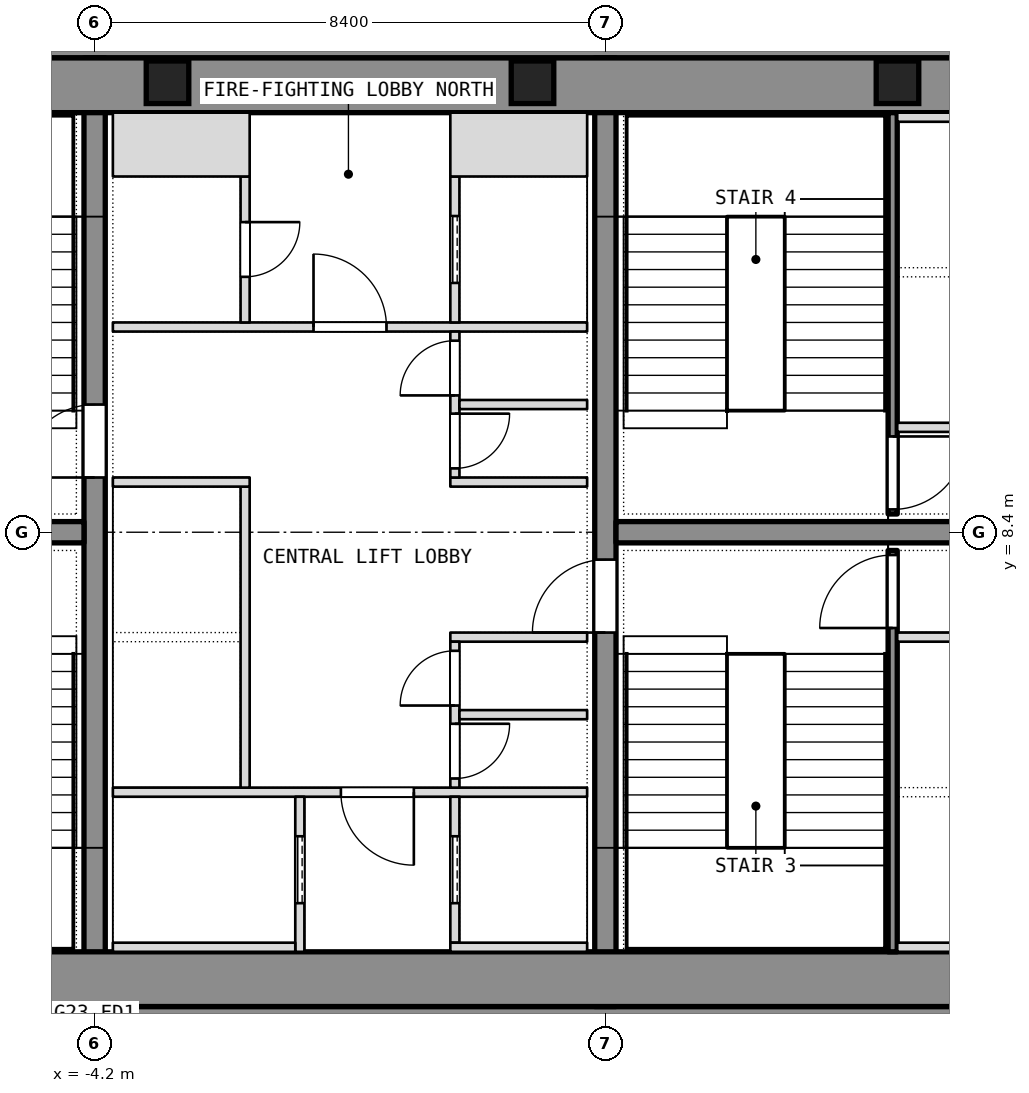
"""IFC4 building model, lengths in metres.
Left out: names, types, materials, properties, quantities, classifications, styles, units other than length and angle.
Written with IfcOpenShell. Run it as: python <this file> out.ifc"""

import sys

from ifc_helpers import new_model, si_unit, direction, frame, frame_2d, origin, origin_2d, place, context, subcontext, project, spatial, rectangle, extrude, element, fill, save


model = new_model("IFC4")
c1 = context("Model", 3, precision=1e-05, world=origin(), true_north=direction((0.0, 1.0)))
c2 = subcontext(c1, "Body", "Model", "MODEL_VIEW")
j1 = project(units=[si_unit("LENGTHUNIT", "METRE"), si_unit("PLANEANGLEUNIT", "RADIAN")], contexts=[c1])
p1 = place(None, origin())
s1 = spatial("IfcSite", under=j1, at=p1, CompositionType="ELEMENT")
p2 = place(p1, origin())
s2 = spatial("IfcBuilding", under=s1, at=p2, CompositionType="ELEMENT")
p3 = place(p2, frame((0.0, 0.0, 270.5)))
s3 = spatial("IfcBuildingStorey", under=s2, at=p3, CompositionType="ELEMENT", Elevation=270.5)
for number, where, z_axis, x_axis in (
    (1, (-11.1, 0.3, 0.0), (0.0, 0.0, 1.0), (1.0, 0.0, 0.0)),
    (2, (-11.1, 16.5, 0.0), (0.0, 0.0, 1.0), (1.0, 0.0, 0.0)),
):
    element("IfcWall", number, at=place(p3, frame(where, z_axis=z_axis, x_axis=x_axis)), inside=s3, PredefinedType="SHEAR", context=c2, shape_type="SweptSolid", body=[
        extrude(rectangle(XDim=22.2, YDim=0.6, at=frame_2d((11.1, 0.0))), origin(), (0.0, 0.0, 1.0), 3.6),
    ])
p4 = place(p3, frame((-4.2, 0.6, 0.0), z_axis=(0.0, 0.0, 1.0), x_axis=(0.0, 1.0, 0.0)))
e3 = element("IfcWall", 3, at=p4, inside=s3, PredefinedType="SHEAR", context=c2, shape_type="SweptSolid", body=[
    extrude(rectangle(XDim=15.6, YDim=0.35, at=frame_2d((7.8, 0.0))), origin(), (0.0, 0.0, 1.0), 3.6),
])
p5 = place(p4, frame((8.7, 0.0, 0.0)))
e4 = element("IfcOpeningElement", 4, at=p5, cuts=e3, PredefinedType="OPENING", context=c2, shape_type="SweptSolid", body=[
    extrude(rectangle(XDim=1.2, YDim=2.1, at=frame_2d((0.6, 1.05))), frame((0.0, 0.175, 0.0), z_axis=(0.0, -1.0, 0.0), x_axis=(1.0, 0.0, 0.0)), (0.0, 0.0, 1.0), 0.35),
])
p6 = place(p3, frame((4.2, 0.6, 0.0), z_axis=(0.0, 0.0, 1.0), x_axis=(0.0, 1.0, 0.0)))
e5 = element("IfcWall", 5, at=p6, inside=s3, PredefinedType="SHEAR", context=c2, shape_type="SweptSolid", body=[
    extrude(rectangle(XDim=15.6, YDim=0.35, at=frame_2d((7.8, 0.0))), origin(), (0.0, 0.0, 1.0), 3.6),
])
p7 = place(p6, frame((6.15, 0.0, 0.0)))
e6 = element("IfcOpeningElement", 6, at=p7, cuts=e5, PredefinedType="OPENING", context=c2, shape_type="SweptSolid", body=[
    extrude(rectangle(XDim=1.2, YDim=2.1, at=frame_2d((0.6, 1.05))), frame((0.0, 0.175, 0.0), z_axis=(0.0, -1.0, 0.0), x_axis=(1.0, 0.0, 0.0)), (0.0, 0.0, 1.0), 0.35),
])
for number, where, z_axis, x_axis in (
    (7, (-11.1, 8.4, 0.0), (0.0, 0.0, 1.0), (1.0, 0.0, 0.0)),
    (8, (4.375, 8.4, 0.0), (0.0, 0.0, 1.0), (1.0, 0.0, 0.0)),
):
    element("IfcWall", number, at=place(p3, frame(where, z_axis=z_axis, x_axis=x_axis)), inside=s3, PredefinedType="SHEAR", context=c2, shape_type="SweptSolid", body=[
        extrude(rectangle(XDim=6.725, YDim=0.35, at=frame_2d((3.363, 0.0))), origin(), (0.0, 0.0, 1.0), 3.6),
    ])
for number, where, z_axis, x_axis in (
    (9, (-3.001, 15.8, 0.0), (0.0, 0.0, 1.0), (1.0, 0.0, 0.0)),
    (10, (3.001, 15.8, 0.0), (0.0, 0.0, 1.0), (1.0, 0.0, 0.0)),
    (11, (9.004, 15.8, 0.0), (0.0, 0.0, 1.0), (1.0, 0.0, 0.0)),
):
    element("IfcColumn", number, at=place(p3, frame(where, z_axis=z_axis, x_axis=x_axis)), inside=s3, PredefinedType="COLUMN", context=c2, shape_type="SweptSolid", body=[
        extrude(rectangle(XDim=0.7, YDim=0.7, at=origin_2d()), origin(), (0.0, 0.0, 1.0), 3.6),
    ])
for number, where, z_axis, x_axis in (
    (12, (-11.1, 1.05, 0.0), (0.0, 0.0, 1.0), (1.0, 0.0, 0.0)),
    (13, (-11.1, 15.75, 0.0), (0.0, 0.0, 1.0), (1.0, 0.0, 0.0)),
):
    element("IfcWall", number, at=place(p3, frame(where, z_axis=z_axis, x_axis=x_axis)), inside=s3, PredefinedType="PARTITIONING", context=c2, shape_type="SweptSolid", body=[
        extrude(rectangle(XDim=22.2, YDim=0.9, at=frame_2d((11.1, 0.0))), origin(), (0.0, 0.0, 1.0), 3.34),
    ])
p8 = place(p3, frame((8.925, 1.5, 0.0), z_axis=(0.0, 0.0, 1.0), x_axis=(0.0, 1.0, 0.0)))
e14 = element("IfcWall", 14, at=p8, inside=s3, PredefinedType="SHEAR", context=c2, shape_type="SweptSolid", body=[
    extrude(rectangle(XDim=6.6, YDim=0.15, at=frame_2d((3.3, 0.0))), origin(), (0.0, 0.0, 1.0), 3.34),
])
p9 = place(p8, frame((5.325, 0.0, 0.0)))
e15 = element("IfcOpeningElement", 15, at=p9, cuts=e14, PredefinedType="OPENING", context=c2, shape_type="SweptSolid", body=[
    extrude(rectangle(XDim=1.2, YDim=2.1, at=frame_2d((0.6, 1.05))), frame((0.0, 0.075, 0.0), z_axis=(0.0, -1.0, 0.0), x_axis=(1.0, 0.0, 0.0)), (0.0, 0.0, 1.0), 0.15),
])
for number, where, z_axis, x_axis in (
    (16, (9.0, 6.675, 0.0), (0.0, 0.0, 1.0), (1.0, 0.0, 0.0)),
    (17, (9.0, 1.575, 0.0), (0.0, 0.0, 1.0), (1.0, 0.0, 0.0)),
):
    element("IfcWall", number, at=place(p3, frame(where, z_axis=z_axis, x_axis=x_axis)), inside=s3, PredefinedType="SHEAR", context=c2, shape_type="SweptSolid", body=[
        extrude(rectangle(XDim=2.1, YDim=0.15, at=frame_2d((1.05, 0.0))), origin(), (0.0, 0.0, 1.0), 3.6),
    ])
p10 = place(p3, frame((8.925, 8.7, 0.0), z_axis=(0.0, 0.0, 1.0), x_axis=(0.0, 1.0, 0.0)))
e18 = element("IfcWall", 18, at=p10, inside=s3, PredefinedType="SHEAR", context=c2, shape_type="SweptSolid", body=[
    extrude(rectangle(XDim=6.6, YDim=0.15, at=frame_2d((3.3, 0.0))), origin(), (0.0, 0.0, 1.0), 3.34),
])
p11 = place(p10, frame((0.075, 0.0, 0.0)))
e19 = element("IfcOpeningElement", 19, at=p11, cuts=e18, PredefinedType="OPENING", context=c2, shape_type="SweptSolid", body=[
    extrude(rectangle(XDim=1.2, YDim=2.1, at=frame_2d((0.6, 1.05))), frame((0.0, 0.075, 0.0), z_axis=(0.0, -1.0, 0.0), x_axis=(1.0, 0.0, 0.0)), (0.0, 0.0, 1.0), 0.15),
])
for number, where, z_axis, x_axis in (
    (20, (9.0, 10.125, 0.0), (0.0, 0.0, 1.0), (1.0, 0.0, 0.0)),
    (21, (9.0, 15.225, 0.0), (0.0, 0.0, 1.0), (1.0, 0.0, 0.0)),
):
    element("IfcWall", number, at=place(p3, frame(where, z_axis=z_axis, x_axis=x_axis)), inside=s3, PredefinedType="SHEAR", context=c2, shape_type="SweptSolid", body=[
        extrude(rectangle(XDim=2.1, YDim=0.15, at=frame_2d((1.05, 0.0))), origin(), (0.0, 0.0, 1.0), 3.6),
    ])
p12 = place(p3, frame((-3.9, 4.125, 0.0), z_axis=(0.0, 0.0, 1.0), x_axis=(1.0, 0.0, 0.0)))
e22 = element("IfcWall", 22, at=p12, inside=s3, PredefinedType="PARTITIONING", context=c2, shape_type="SweptSolid", body=[
    extrude(rectangle(XDim=7.8, YDim=0.15, at=frame_2d((3.9, 0.0))), origin(), (0.0, 0.0, 1.0), 3.34),
])
p13 = place(p12, frame((3.75, 0.0, 0.0)))
e23 = element("IfcOpeningElement", 23, at=p13, cuts=e22, PredefinedType="OPENING", context=c2, shape_type="SweptSolid", body=[
    extrude(rectangle(XDim=1.2, YDim=2.1, at=frame_2d((0.6, 1.05))), frame((0.0, 0.075, 0.0), z_axis=(0.0, -1.0, 0.0), x_axis=(1.0, 0.0, 0.0)), (0.0, 0.0, 1.0), 0.15),
])
p14 = place(p3, frame((-3.9, 11.775, 0.0), z_axis=(0.0, 0.0, 1.0), x_axis=(1.0, 0.0, 0.0)))
e24 = element("IfcWall", 24, at=p14, inside=s3, PredefinedType="PARTITIONING", context=c2, shape_type="SweptSolid", body=[
    extrude(rectangle(XDim=7.8, YDim=0.15, at=frame_2d((3.9, 0.0))), origin(), (0.0, 0.0, 1.0), 3.34),
])
p15 = place(p14, frame((3.3, 0.0, 0.0)))
e25 = element("IfcOpeningElement", 25, at=p15, cuts=e24, PredefinedType="OPENING", context=c2, shape_type="SweptSolid", body=[
    extrude(rectangle(XDim=1.2, YDim=2.1, at=frame_2d((0.6, 1.05))), frame((0.0, 0.075, 0.0), z_axis=(0.0, -1.0, 0.0), x_axis=(1.0, 0.0, 0.0)), (0.0, 0.0, 1.0), 0.15),
])
p16 = place(p3, frame((-0.825, 1.5, 0.0), z_axis=(0.0, 0.0, 1.0), x_axis=(0.0, 1.0, 0.0)))
e26 = element("IfcWall", 26, at=p16, inside=s3, PredefinedType="SHEAR", context=c2, shape_type="SweptSolid", body=[
    extrude(rectangle(XDim=2.55, YDim=0.15, at=frame_2d((1.275, 0.0))), origin(), (0.0, 0.0, 1.0), 3.6),
])
p17 = place(p16, frame((0.8, 0.0, 0.0)))
e27 = element("IfcOpeningElement", 27, at=p17, cuts=e26, PredefinedType="OPENING", context=c2, shape_type="SweptSolid", body=[
    extrude(rectangle(XDim=1.1, YDim=2.1, at=frame_2d((0.55, 1.05))), frame((0.0, 0.075, 0.0), z_axis=(0.0, -1.0, 0.0), x_axis=(1.0, 0.0, 0.0)), (0.0, 0.0, 1.0), 0.15),
])
p18 = place(p3, frame((-3.9, 1.575, 0.0), z_axis=(0.0, 0.0, 1.0), x_axis=(1.0, 0.0, 0.0)))
e28 = element("IfcWall", 28, at=p18, inside=s3, PredefinedType="SHEAR", context=c2, shape_type="SweptSolid", body=[
    extrude(rectangle(XDim=3.0, YDim=0.15, at=frame_2d((1.5, 0.0))), origin(), (0.0, 0.0, 1.0), 3.6),
])
p19 = place(p3, frame((-1.725, 4.2, 0.0), z_axis=(0.0, 0.0, 1.0), x_axis=(0.0, 1.0, 0.0)))
e29 = element("IfcWall", 29, at=p19, inside=s3, PredefinedType="SHEAR", context=c2, shape_type="SweptSolid", body=[
    extrude(rectangle(XDim=4.95, YDim=0.15, at=frame_2d((2.475, 0.0))), origin(), (0.0, 0.0, 1.0), 3.6),
])
p20 = place(p3, frame((-3.9, 9.225, 0.0), z_axis=(0.0, 0.0, 1.0), x_axis=(1.0, 0.0, 0.0)))
e30 = element("IfcWall", 30, at=p20, inside=s3, PredefinedType="SHEAR", context=c2, shape_type="SweptSolid", body=[
    extrude(rectangle(XDim=2.25, YDim=0.15, at=frame_2d((1.125, 0.0))), origin(), (0.0, 0.0, 1.0), 3.6),
])
p21 = place(p3, frame((-1.725, 11.85, 0.0), z_axis=(0.0, 0.0, 1.0), x_axis=(0.0, 1.0, 0.0)))
e31 = element("IfcWall", 31, at=p21, inside=s3, PredefinedType="PARTITIONING", context=c2, shape_type="SweptSolid", body=[
    extrude(rectangle(XDim=2.4, YDim=0.15, at=frame_2d((1.2, 0.0))), origin(), (0.0, 0.0, 1.0), 3.34),
])
p22 = place(p21, frame((0.75, 0.0, 0.0)))
e32 = element("IfcOpeningElement", 32, at=p22, cuts=e31, PredefinedType="OPENING", context=c2, shape_type="SweptSolid", body=[
    extrude(rectangle(XDim=0.9, YDim=2.1, at=frame_2d((0.45, 1.05))), frame((0.0, 0.075, 0.0), z_axis=(0.0, -1.0, 0.0), x_axis=(1.0, 0.0, 0.0)), (0.0, 0.0, 1.0), 0.15),
])
p23 = place(p3, frame((-3.9, 14.775, 0.0), z_axis=(0.0, 0.0, 1.0), x_axis=(1.0, 0.0, 0.0)))
e33 = element("IfcWall", 33, at=p23, inside=s3, PredefinedType="PARTITIONING", context=c2, shape_type="SweptSolid", body=[
    extrude(rectangle(XDim=2.25, YDim=1.05, at=frame_2d((1.125, 0.0))), origin(), (0.0, 0.0, 1.0), 3.34),
])
p24 = place(p3, frame((1.725, 1.65, 0.0), z_axis=(0.0, 0.0, 1.0), x_axis=(0.0, 1.0, 0.0)))
e34 = element("IfcWall", 34, at=p24, inside=s3, PredefinedType="SHEAR", context=c2, shape_type="SweptSolid", body=[
    extrude(rectangle(XDim=2.4, YDim=0.15, at=frame_2d((1.2, 0.0))), origin(), (0.0, 0.0, 1.0), 3.6),
])
p25 = place(p24, frame((0.65, 0.0, 0.0)))
e35 = element("IfcOpeningElement", 35, at=p25, cuts=e34, PredefinedType="OPENING", context=c2, shape_type="SweptSolid", body=[
    extrude(rectangle(XDim=1.1, YDim=2.1, at=frame_2d((0.55, 1.05))), frame((0.0, 0.075, 0.0), z_axis=(0.0, -1.0, 0.0), x_axis=(1.0, 0.0, 0.0)), (0.0, 0.0, 1.0), 0.15),
])
p26 = place(p3, frame((1.65, 1.575, 0.0), z_axis=(0.0, 0.0, 1.0), x_axis=(1.0, 0.0, 0.0)))
e36 = element("IfcWall", 36, at=p26, inside=s3, PredefinedType="SHEAR", context=c2, shape_type="SweptSolid", body=[
    extrude(rectangle(XDim=2.25, YDim=0.15, at=frame_2d((1.125, 0.0))), origin(), (0.0, 0.0, 1.0), 3.6),
])
p27 = place(p3, frame((1.725, 11.85, 0.0), z_axis=(0.0, 0.0, 1.0), x_axis=(0.0, 1.0, 0.0)))
e37 = element("IfcWall", 37, at=p27, inside=s3, PredefinedType="SHEAR", context=c2, shape_type="SweptSolid", body=[
    extrude(rectangle(XDim=2.4, YDim=0.15, at=frame_2d((1.2, 0.0))), origin(), (0.0, 0.0, 1.0), 3.6),
])
p28 = place(p27, frame((0.65, 0.0, 0.0)))
e38 = element("IfcOpeningElement", 38, at=p28, cuts=e37, PredefinedType="OPENING", context=c2, shape_type="SweptSolid", body=[
    extrude(rectangle(XDim=1.1, YDim=2.1, at=frame_2d((0.55, 1.05))), frame((0.0, 0.075, 0.0), z_axis=(0.0, -1.0, 0.0), x_axis=(1.0, 0.0, 0.0)), (0.0, 0.0, 1.0), 0.15),
])
p29 = place(p3, frame((1.65, 14.775, 0.0), z_axis=(0.0, 0.0, 1.0), x_axis=(1.0, 0.0, 0.0)))
e39 = element("IfcWall", 39, at=p29, inside=s3, PredefinedType="SHEAR", context=c2, shape_type="SweptSolid", body=[
    extrude(rectangle(XDim=2.25, YDim=1.05, at=frame_2d((1.125, 0.0))), origin(), (0.0, 0.0, 1.0), 3.6),
])
for number, where, z_axis, x_axis in (
    (40, (1.65, 6.675, 0.0), (0.0, 0.0, 1.0), (1.0, 0.0, 0.0)),
    (41, (1.65, 9.225, 0.0), (0.0, 0.0, 1.0), (1.0, 0.0, 0.0)),
):
    element("IfcWall", number, at=place(p3, frame(where, z_axis=z_axis, x_axis=x_axis)), inside=s3, PredefinedType="PARTITIONING", context=c2, shape_type="SweptSolid", body=[
        extrude(rectangle(XDim=2.25, YDim=0.15, at=frame_2d((1.125, 0.0))), origin(), (0.0, 0.0, 1.0), 3.34),
    ])
p30 = place(p3, frame((1.725, 4.2, 0.0), z_axis=(0.0, 0.0, 1.0), x_axis=(0.0, 1.0, 0.0)))
e42 = element("IfcWall", 42, at=p30, inside=s3, PredefinedType="PARTITIONING", context=c2, shape_type="SweptSolid", body=[
    extrude(rectangle(XDim=2.4, YDim=0.15, at=frame_2d((1.2, 0.0))), origin(), (0.0, 0.0, 1.0), 3.34),
])
p31 = place(p30, frame((0.15, 0.0, 0.0)))
e43 = element("IfcOpeningElement", 43, at=p31, cuts=e42, PredefinedType="OPENING", context=c2, shape_type="SweptSolid", body=[
    extrude(rectangle(XDim=0.9, YDim=2.1, at=frame_2d((0.45, 1.05))), frame((0.0, 0.075, 0.0), z_axis=(0.0, -1.0, 0.0), x_axis=(1.0, 0.0, 0.0)), (0.0, 0.0, 1.0), 0.15),
])
p32 = place(p30, frame((1.35, 0.0, 0.0)))
e44 = element("IfcOpeningElement", 44, at=p32, cuts=e42, PredefinedType="OPENING", context=c2, shape_type="SweptSolid", body=[
    extrude(rectangle(XDim=0.9, YDim=2.1, at=frame_2d((0.45, 1.05))), frame((0.0, 0.075, 0.0), z_axis=(0.0, -1.0, 0.0), x_axis=(1.0, 0.0, 0.0)), (0.0, 0.0, 1.0), 0.15),
])
p33 = place(p3, frame((1.725, 9.3, 0.0), z_axis=(0.0, 0.0, 1.0), x_axis=(0.0, 1.0, 0.0)))
e45 = element("IfcWall", 45, at=p33, inside=s3, PredefinedType="PARTITIONING", context=c2, shape_type="SweptSolid", body=[
    extrude(rectangle(XDim=2.4, YDim=0.15, at=frame_2d((1.2, 0.0))), origin(), (0.0, 0.0, 1.0), 3.34),
])
p34 = place(p33, frame((0.15, 0.0, 0.0)))
e46 = element("IfcOpeningElement", 46, at=p34, cuts=e45, PredefinedType="OPENING", context=c2, shape_type="SweptSolid", body=[
    extrude(rectangle(XDim=0.9, YDim=2.1, at=frame_2d((0.45, 1.05))), frame((0.0, 0.075, 0.0), z_axis=(0.0, -1.0, 0.0), x_axis=(1.0, 0.0, 0.0)), (0.0, 0.0, 1.0), 0.15),
])
p35 = place(p33, frame((1.35, 0.0, 0.0)))
e47 = element("IfcOpeningElement", 47, at=p35, cuts=e45, PredefinedType="OPENING", context=c2, shape_type="SweptSolid", body=[
    extrude(rectangle(XDim=0.9, YDim=2.1, at=frame_2d((0.45, 1.05))), frame((0.0, 0.075, 0.0), z_axis=(0.0, -1.0, 0.0), x_axis=(1.0, 0.0, 0.0)), (0.0, 0.0, 1.0), 0.15),
])
for number, where, z_axis, x_axis in (
    (48, (1.8, 5.4, 0.0), (0.0, 0.0, 1.0), (1.0, 0.0, 0.0)),
    (49, (1.8, 10.5, 0.0), (0.0, 0.0, 1.0), (1.0, 0.0, 0.0)),
):
    element("IfcWall", number, at=place(p3, frame(where, z_axis=z_axis, x_axis=x_axis)), inside=s3, PredefinedType="PARTITIONING", context=c2, shape_type="SweptSolid", body=[
        extrude(rectangle(XDim=2.1, YDim=0.15, at=frame_2d((1.05, 0.0))), origin(), (0.0, 0.0, 1.0), 3.34),
    ])
p36 = place(p9, origin())
e50 = element("IfcDoor", 50, at=p36, inside=s3, OperationType="SINGLE_SWING_LEFT", PredefinedType="DOOR", context=c2, shape_type="SweptSolid", body=[
    extrude(rectangle(XDim=1.2, YDim=2.1, at=frame_2d((0.6, 1.05))), frame((0.0, 0.025, 0.0), z_axis=(0.0, -1.0, 0.0), x_axis=(1.0, 0.0, 0.0)), (0.0, 0.0, 1.0), 0.05),
])
fill(e15, e50)
p37 = place(p11, origin())
e51 = element("IfcDoor", 51, at=p37, inside=s3, OperationType="SINGLE_SWING_LEFT", PredefinedType="DOOR", context=c2, shape_type="SweptSolid", body=[
    extrude(rectangle(XDim=1.2, YDim=2.1, at=frame_2d((0.6, 1.05))), frame((0.0, 0.025, 0.0), z_axis=(0.0, -1.0, 0.0), x_axis=(1.0, 0.0, 0.0)), (0.0, 0.0, 1.0), 0.05),
])
fill(e19, e51)
p38 = place(p31, origin())
e52 = element("IfcDoor", 52, at=p38, inside=s3, OperationType="SINGLE_SWING_LEFT", PredefinedType="DOOR", context=c2, shape_type="SweptSolid", body=[
    extrude(rectangle(XDim=0.9, YDim=2.1, at=frame_2d((0.45, 1.05))), frame((0.0, 0.025, 0.0), z_axis=(0.0, -1.0, 0.0), x_axis=(1.0, 0.0, 0.0)), (0.0, 0.0, 1.0), 0.05),
])
fill(e43, e52)
p39 = place(p32, origin())
e53 = element("IfcDoor", 53, at=p39, inside=s3, OperationType="SINGLE_SWING_LEFT", PredefinedType="DOOR", context=c2, shape_type="SweptSolid", body=[
    extrude(rectangle(XDim=0.9, YDim=2.1, at=frame_2d((0.45, 1.05))), frame((0.0, 0.025, 0.0), z_axis=(0.0, -1.0, 0.0), x_axis=(1.0, 0.0, 0.0)), (0.0, 0.0, 1.0), 0.05),
])
fill(e44, e53)
p40 = place(p34, origin())
e54 = element("IfcDoor", 54, at=p40, inside=s3, OperationType="SINGLE_SWING_LEFT", PredefinedType="DOOR", context=c2, shape_type="SweptSolid", body=[
    extrude(rectangle(XDim=0.9, YDim=2.1, at=frame_2d((0.45, 1.05))), frame((0.0, 0.025, 0.0), z_axis=(0.0, -1.0, 0.0), x_axis=(1.0, 0.0, 0.0)), (0.0, 0.0, 1.0), 0.05),
])
fill(e46, e54)
p41 = place(p35, origin())
e55 = element("IfcDoor", 55, at=p41, inside=s3, OperationType="SINGLE_SWING_LEFT", PredefinedType="DOOR", context=c2, shape_type="SweptSolid", body=[
    extrude(rectangle(XDim=0.9, YDim=2.1, at=frame_2d((0.45, 1.05))), frame((0.0, 0.025, 0.0), z_axis=(0.0, -1.0, 0.0), x_axis=(1.0, 0.0, 0.0)), (0.0, 0.0, 1.0), 0.05),
])
fill(e47, e55)
p42 = place(p17, origin())
e56 = element("IfcDoor", 56, at=p42, inside=s3, OperationType="SLIDING_TO_LEFT", PredefinedType="DOOR", context=c2, shape_type="SweptSolid", body=[
    extrude(rectangle(XDim=1.1, YDim=2.1, at=frame_2d((0.55, 1.05))), frame((0.0, 0.025, 0.0), z_axis=(0.0, -1.0, 0.0), x_axis=(1.0, 0.0, 0.0)), (0.0, 0.0, 1.0), 0.05),
])
fill(e27, e56)
p43 = place(p25, origin())
e57 = element("IfcDoor", 57, at=p43, inside=s3, OperationType="SLIDING_TO_LEFT", PredefinedType="DOOR", context=c2, shape_type="SweptSolid", body=[
    extrude(rectangle(XDim=1.1, YDim=2.1, at=frame_2d((0.55, 1.05))), frame((0.0, 0.025, 0.0), z_axis=(0.0, -1.0, 0.0), x_axis=(1.0, 0.0, 0.0)), (0.0, 0.0, 1.0), 0.05),
])
fill(e35, e57)
p44 = place(p28, origin())
e58 = element("IfcDoor", 58, at=p44, inside=s3, OperationType="SLIDING_TO_LEFT", PredefinedType="DOOR", context=c2, shape_type="SweptSolid", body=[
    extrude(rectangle(XDim=1.1, YDim=2.1, at=frame_2d((0.55, 1.05))), frame((0.0, 0.025, 0.0), z_axis=(0.0, -1.0, 0.0), x_axis=(1.0, 0.0, 0.0)), (0.0, 0.0, 1.0), 0.05),
])
fill(e38, e58)
p45 = place(p13, origin())
e59 = element("IfcDoor", 59, at=p45, inside=s3, OperationType="SINGLE_SWING_LEFT", PredefinedType="DOOR", context=c2, shape_type="SweptSolid", body=[
    extrude(rectangle(XDim=1.2, YDim=2.1, at=frame_2d((0.6, 1.05))), frame((0.0, 0.025, 0.0), z_axis=(0.0, -1.0, 0.0), x_axis=(1.0, 0.0, 0.0)), (0.0, 0.0, 1.0), 0.05),
])
fill(e23, e59)
p46 = place(p15, origin())
e60 = element("IfcDoor", 60, at=p46, inside=s3, OperationType="SINGLE_SWING_LEFT", PredefinedType="DOOR", context=c2, shape_type="SweptSolid", body=[
    extrude(rectangle(XDim=1.2, YDim=2.1, at=frame_2d((0.6, 1.05))), frame((0.0, 0.025, 0.0), z_axis=(0.0, -1.0, 0.0), x_axis=(1.0, 0.0, 0.0)), (0.0, 0.0, 1.0), 0.05),
])
fill(e25, e60)
p47 = place(p22, origin())
e61 = element("IfcDoor", 61, at=p47, inside=s3, OperationType="SINGLE_SWING_LEFT", PredefinedType="DOOR", context=c2, shape_type="SweptSolid", body=[
    extrude(rectangle(XDim=0.9, YDim=2.1, at=frame_2d((0.45, 1.05))), frame((0.0, 0.025, 0.0), z_axis=(0.0, -1.0, 0.0), x_axis=(1.0, 0.0, 0.0)), (0.0, 0.0, 1.0), 0.05),
])
fill(e32, e61)
p48 = place(p5, origin())
e62 = element("IfcDoor", 62, at=p48, inside=s3, OperationType="SINGLE_SWING_LEFT", PredefinedType="DOOR", context=c2, shape_type="SweptSolid", body=[
    extrude(rectangle(XDim=1.2, YDim=2.1, at=frame_2d((0.6, 1.05))), frame((0.0, 0.025, 0.0), z_axis=(0.0, -1.0, 0.0), x_axis=(1.0, 0.0, 0.0)), (0.0, 0.0, 1.0), 0.05),
])
fill(e4, e62)
p49 = place(p7, origin())
e63 = element("IfcDoor", 63, at=p49, inside=s3, OperationType="SINGLE_SWING_LEFT", PredefinedType="DOOR", context=c2, shape_type="SweptSolid", body=[
    extrude(rectangle(XDim=1.2, YDim=2.1, at=frame_2d((0.6, 1.05))), frame((0.0, 0.025, 0.0), z_axis=(0.0, -1.0, 0.0), x_axis=(1.0, 0.0, 0.0)), (0.0, 0.0, 1.0), 0.05),
])
fill(e6, e63)
save(model, sys.argv[1])
